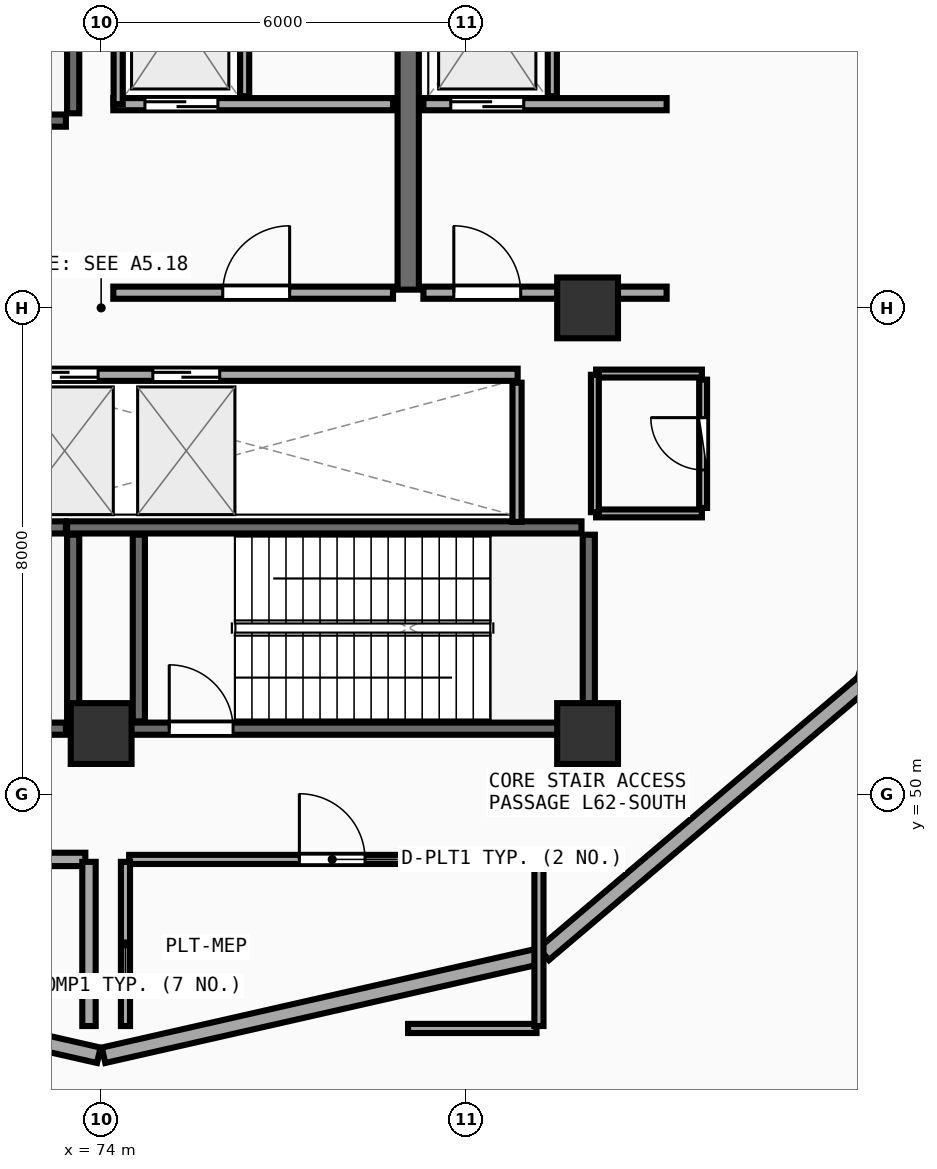
"""IFC4 building model, lengths in metres.
Left out: names, types, materials, properties, quantities, classifications, styles, units other than length and angle.
Written with IfcOpenShell. Run it as: python <this file> out.ifc"""

import sys

from ifc_helpers import new_model, si_unit, direction, frame, frame_2d, origin, origin_2d, place, context, subcontext, project, spatial, rectangle, extrude, element, fill, save


model = new_model("IFC4")
c1 = context("Model", 3, precision=1e-05, world=origin(), true_north=direction((0.0, 1.0)))
c2 = subcontext(c1, "Body", "Model", "MODEL_VIEW")
j1 = project(units=[si_unit("LENGTHUNIT", "METRE"), si_unit("PLANEANGLEUNIT", "RADIAN")], contexts=[c1])
p1 = place(None, origin())
s1 = spatial("IfcSite", under=j1, at=p1, CompositionType="ELEMENT")
p2 = place(p1, origin())
s2 = spatial("IfcBuilding", under=s1, at=p2, CompositionType="ELEMENT")
p3 = place(p2, frame((0.0, 0.0, 242.96)))
s3 = spatial("IfcBuildingStorey", under=s2, at=p3, CompositionType="ELEMENT", Elevation=242.96)
for number, where, z_axis, x_axis in (
    (1, (74.0, 51.0, 0.0), (0.0, 0.0, 1.0), (1.0, 0.0, 0.0)),
    (2, (82.0, 51.0, 0.0), (0.0, 0.0, 1.0), (1.0, 0.0, 0.0)),
    (3, (82.0, 58.0, 0.0), (0.0, 0.0, 1.0), (1.0, 0.0, 0.0)),
):
    element("IfcColumn", number, at=place(p3, frame(where, z_axis=z_axis, x_axis=x_axis)), inside=s3, PredefinedType="PILASTER", context=c2, shape_type="SweptSolid", body=[
        extrude(rectangle(XDim=1.0, YDim=1.0, at=origin_2d()), origin(), (0.0, 0.0, 1.0), 5.74),
    ])
p4 = place(p3, frame((66.789, 47.339, 0.0), z_axis=(0.0, 0.0, 1.0), x_axis=(0.975128290494, -0.221641189938, 0.0)))
e4 = element("IfcWall", 4, at=p4, inside=s3, PredefinedType="SOLIDWALL", context=c2, shape_type="SweptSolid", body=[
    extrude(rectangle(XDim=7.355, YDim=0.26, at=frame_2d((3.677, 0.0))), origin(), (0.0, 0.0, 1.0), 5.06),
])
p5 = place(p4, frame((3.102, 0.0, 0.0)))
e5 = element("IfcOpeningElement", 5, at=p5, cuts=e4, PredefinedType="OPENING", context=c2, shape_type="SweptSolid", body=[
    extrude(rectangle(XDim=1.15, YDim=2.15, at=frame_2d((0.575, 1.075))), frame((0.0, 0.14, 0.0), z_axis=(0.0, -1.0, 0.0), x_axis=(1.0, 0.0, 0.0)), (0.0, 0.0, 1.0), 0.28),
])
p6 = place(p3, frame((74.039, 45.709, 0.0), z_axis=(0.0, 0.0, 1.0), x_axis=(0.975128290494, 0.221641189938, 0.0)))
e6 = element("IfcWall", 6, at=p6, inside=s3, PredefinedType="SOLIDWALL", context=c2, shape_type="SweptSolid", body=[
    extrude(rectangle(XDim=7.355, YDim=0.26, at=frame_2d((3.677, 0.0))), origin(), (0.0, 0.0, 1.0), 5.06),
])
p7 = place(p3, frame((81.281, 47.374, 0.0), z_axis=(0.0, 0.0, 1.0), x_axis=(0.762580748943, 0.646893037018, 0.0)))
e7 = element("IfcWall", 7, at=p7, inside=s3, PredefinedType="SOLIDWALL", context=c2, shape_type="SweptSolid", body=[
    extrude(rectangle(XDim=6.88, YDim=0.26, at=frame_2d((3.44, 0.0))), origin(), (0.0, 0.0, 1.0), 5.06),
])
p8 = place(p3, frame((66.26, 61.08, 0.0), z_axis=(0.0, 0.0, 1.0), x_axis=(1.0, 0.0, 0.0)))
e8 = element("IfcWall", 8, at=p8, inside=s3, PredefinedType="SHEAR", context=c2, shape_type="SweptSolid", body=[
    extrude(rectangle(XDim=7.16, YDim=0.2, at=frame_2d((3.58, 0.0))), origin(), (0.0, 0.0, 1.0), 5.48),
])
p9 = place(p3, frame((73.54, 61.2, 0.0), z_axis=(0.0, 0.0, 1.0), x_axis=(0.0, 1.0, 0.0)))
e9 = element("IfcWall", 9, at=p9, inside=s3, PredefinedType="SHEAR", context=c2, shape_type="SweptSolid", body=[
    extrude(rectangle(XDim=3.07, YDim=0.2, at=frame_2d((1.535, 0.0))), origin(), (0.0, 0.0, 1.0), 5.48),
])
p10 = place(p3, frame((74.0, 51.08, 0.0), z_axis=(0.0, 0.0, 1.0), x_axis=(1.0, 0.0, 0.0)))
e10 = element("IfcWall", 10, at=p10, inside=s3, PredefinedType="SHEAR", context=c2, shape_type="SweptSolid", body=[
    extrude(rectangle(XDim=7.9, YDim=0.2, at=frame_2d((3.95, 0.0))), origin(), (0.0, 0.0, 1.0), 5.48),
])
p11 = place(p10, frame((1.12, 0.0, 0.0)))
e11 = element("IfcOpeningElement", 11, at=p11, cuts=e10, PredefinedType="OPENING", context=c2, shape_type="SweptSolid", body=[
    extrude(rectangle(XDim=1.05, YDim=2.1, at=frame_2d((0.525, 1.05))), frame((0.0, 0.11, 0.0), z_axis=(0.0, -1.0, 0.0), x_axis=(1.0, 0.0, 0.0)), (0.0, 0.0, 1.0), 0.22),
])
p12 = place(p3, frame((82.02, 51.2, 0.0), z_axis=(0.0, 0.0, 1.0), x_axis=(0.0, 1.0, 0.0)))
e12 = element("IfcWall", 12, at=p12, inside=s3, PredefinedType="SHEAR", context=c2, shape_type="SweptSolid", body=[
    extrude(rectangle(XDim=3.07, YDim=0.2, at=frame_2d((1.535, 0.0))), origin(), (0.0, 0.0, 1.0), 5.48),
])
p13 = place(p3, frame((81.9, 54.39, 0.0), z_axis=(0.0, 0.0, 1.0), x_axis=(-1.0, 0.0, 0.0)))
e13 = element("IfcWall", 13, at=p13, inside=s3, PredefinedType="SHEAR", context=c2, shape_type="SweptSolid", body=[
    extrude(rectangle(XDim=8.46, YDim=0.2, at=frame_2d((4.23, 0.0))), origin(), (0.0, 0.0, 1.0), 5.48),
])
p14 = place(p3, frame((74.62, 54.27, 0.0), z_axis=(0.0, 0.0, 1.0), x_axis=(0.0, -1.0, 0.0)))
e14 = element("IfcWall", 14, at=p14, inside=s3, PredefinedType="SHEAR", context=c2, shape_type="SweptSolid", body=[
    extrude(rectangle(XDim=3.07, YDim=0.2, at=frame_2d((1.535, 0.0))), origin(), (0.0, 0.0, 1.0), 5.48),
])
p15 = place(p3, frame((66.26, 51.08, 0.0), z_axis=(0.0, 0.0, 1.0), x_axis=(1.0, 0.0, 0.0)))
e15 = element("IfcWall", 15, at=p15, inside=s3, PredefinedType="SHEAR", context=c2, shape_type="SweptSolid", body=[
    extrude(rectangle(XDim=7.16, YDim=0.2, at=frame_2d((3.58, 0.0))), origin(), (0.0, 0.0, 1.0), 5.48),
])
p16 = place(p3, frame((73.54, 51.2, 0.0), z_axis=(0.0, 0.0, 1.0), x_axis=(0.0, 1.0, 0.0)))
e16 = element("IfcWall", 16, at=p16, inside=s3, PredefinedType="SHEAR", context=c2, shape_type="SweptSolid", body=[
    extrude(rectangle(XDim=3.07, YDim=0.2, at=frame_2d((1.535, 0.0))), origin(), (0.0, 0.0, 1.0), 5.48),
])
p17 = place(p3, frame((73.42, 54.39, 0.0), z_axis=(0.0, 0.0, 1.0), x_axis=(-1.0, 0.0, 0.0)))
e17 = element("IfcWall", 17, at=p17, inside=s3, PredefinedType="SHEAR", context=c2, shape_type="SweptSolid", body=[
    extrude(rectangle(XDim=7.16, YDim=0.2, at=frame_2d((3.58, 0.0))), origin(), (0.0, 0.0, 1.0), 5.48),
])
p18 = place(p3, frame((79.05, 58.3, 0.0), z_axis=(0.0, 0.0, 1.0), x_axis=(0.0, 1.0, 0.0)))
e18 = element("IfcWall", 18, at=p18, inside=s3, PredefinedType="SHEAR", context=c2, shape_type="SweptSolid", body=[
    extrude(rectangle(XDim=6.3, YDim=0.35, at=frame_2d((3.15, 0.0))), origin(), (0.0, 0.0, 1.0), 5.48),
])
p19 = place(p3, frame((74.2, 61.35, 0.0), z_axis=(0.0, 0.0, 1.0), x_axis=(1.0, 0.0, 0.0)))
e19 = element("IfcWall", 19, at=p19, inside=s3, PredefinedType="SOLIDWALL", context=c2, shape_type="SweptSolid", body=[
    extrude(rectangle(XDim=4.6, YDim=0.2, at=frame_2d((2.3, 0.0))), origin(), (0.0, 0.0, 1.0), 5.47),
])
p20 = place(p19, frame((0.52, 0.0, 0.0)))
e20 = element("IfcOpeningElement", 20, at=p20, cuts=e19, PredefinedType="OPENING", context=c2, shape_type="SweptSolid", body=[
    extrude(rectangle(XDim=1.2, YDim=2.15, at=frame_2d((0.6, 1.075))), frame((0.0, 0.11, 0.0), z_axis=(0.0, -1.0, 0.0), x_axis=(1.0, 0.0, 0.0)), (0.0, 0.0, 1.0), 0.22),
])
p21 = place(p3, frame((74.28, 61.35, 0.0), z_axis=(0.0, 0.0, 1.0), x_axis=(0.0, 1.0, 0.0)))
e21 = element("IfcWall", 21, at=p21, inside=s3, PredefinedType="PARTITIONING", context=c2, shape_type="SweptSolid", body=[
    extrude(rectangle(XDim=2.97, YDim=0.15, at=frame_2d((1.485, 0.0))), origin(), (0.0, 0.0, 1.0), 5.47),
])
p22 = place(p3, frame((76.36, 61.48, 0.0), z_axis=(0.0, 0.0, 1.0), x_axis=(0.0, 1.0, 0.0)))
e22 = element("IfcWall", 22, at=p22, inside=s3, PredefinedType="PARTITIONING", context=c2, shape_type="SweptSolid", body=[
    extrude(rectangle(XDim=2.84, YDim=0.15, at=frame_2d((1.42, 0.0))), origin(), (0.0, 0.0, 1.0), 5.47),
])
p23 = place(p3, frame((79.3, 61.35, 0.0), z_axis=(0.0, 0.0, 1.0), x_axis=(1.0, 0.0, 0.0)))
e23 = element("IfcWall", 23, at=p23, inside=s3, PredefinedType="SOLIDWALL", context=c2, shape_type="SweptSolid", body=[
    extrude(rectangle(XDim=4.0, YDim=0.2, at=frame_2d((2.0, 0.0))), origin(), (0.0, 0.0, 1.0), 4.765),
])
p24 = place(p23, frame((0.45, 0.0, 0.0)))
e24 = element("IfcOpeningElement", 24, at=p24, cuts=e23, PredefinedType="OPENING", context=c2, shape_type="SweptSolid", body=[
    extrude(rectangle(XDim=1.2, YDim=2.15, at=frame_2d((0.6, 1.075))), frame((0.0, 0.11, 0.0), z_axis=(0.0, -1.0, 0.0), x_axis=(1.0, 0.0, 0.0)), (0.0, 0.0, 1.0), 0.22),
])
p25 = place(p3, frame((81.42, 61.48, 0.0), z_axis=(0.0, 0.0, 1.0), x_axis=(0.0, 1.0, 0.0)))
e25 = element("IfcWall", 25, at=p25, inside=s3, PredefinedType="PARTITIONING", context=c2, shape_type="SweptSolid", body=[
    extrude(rectangle(XDim=2.84, YDim=0.15, at=frame_2d((1.42, 0.0))), origin(), (0.0, 0.0, 1.0), 5.47),
])
p26 = place(p3, frame((74.2, 58.25, 0.0), z_axis=(0.0, 0.0, 1.0), x_axis=(1.0, 0.0, 0.0)))
e26 = element("IfcWall", 26, at=p26, inside=s3, PredefinedType="SOLIDWALL", context=c2, shape_type="SweptSolid", body=[
    extrude(rectangle(XDim=4.6, YDim=0.2, at=frame_2d((2.3, 0.0))), origin(), (0.0, 0.0, 1.0), 5.47),
])
p27 = place(p26, frame((1.8, 0.0, 0.0)))
e27 = element("IfcOpeningElement", 27, at=p27, cuts=e26, PredefinedType="OPENING", context=c2, shape_type="SweptSolid", body=[
    extrude(rectangle(XDim=1.1, YDim=2.1, at=frame_2d((0.55, 1.05))), frame((0.0, 0.11, 0.0), z_axis=(0.0, -1.0, 0.0), x_axis=(1.0, 0.0, 0.0)), (0.0, 0.0, 1.0), 0.22),
])
p28 = place(p3, frame((79.3, 58.25, 0.0), z_axis=(0.0, 0.0, 1.0), x_axis=(1.0, 0.0, 0.0)))
e28 = element("IfcWall", 28, at=p28, inside=s3, PredefinedType="SOLIDWALL", context=c2, shape_type="SweptSolid", body=[
    extrude(rectangle(XDim=4.0, YDim=0.2, at=frame_2d((2.0, 0.0))), origin(), (0.0, 0.0, 1.0), 4.765),
])
p29 = place(p28, frame((0.5, 0.0, 0.0)))
e29 = element("IfcOpeningElement", 29, at=p29, cuts=e28, PredefinedType="OPENING", context=c2, shape_type="SweptSolid", body=[
    extrude(rectangle(XDim=1.1, YDim=2.1, at=frame_2d((0.55, 1.05))), frame((0.0, 0.11, 0.0), z_axis=(0.0, -1.0, 0.0), x_axis=(1.0, 0.0, 0.0)), (0.0, 0.0, 1.0), 0.22),
])
p30 = place(p3, frame((72.45, 56.9, 0.0), z_axis=(0.0, 0.0, 1.0), x_axis=(1.0, 0.0, 0.0)))
e30 = element("IfcWall", 30, at=p30, inside=s3, PredefinedType="SOLIDWALL", context=c2, shape_type="SweptSolid", body=[
    extrude(rectangle(XDim=8.4, YDim=0.2, at=frame_2d((4.2, 0.0))), origin(), (0.0, 0.0, 1.0), 5.47),
])
p31 = place(p30, frame((0.4, 0.0, 0.0)))
e31 = element("IfcOpeningElement", 31, at=p31, cuts=e30, PredefinedType="OPENING", context=c2, shape_type="SweptSolid", body=[
    extrude(rectangle(XDim=1.1, YDim=2.1, at=frame_2d((0.55, 1.05))), frame((0.0, 0.11, 0.0), z_axis=(0.0, -1.0, 0.0), x_axis=(1.0, 0.0, 0.0)), (0.0, 0.0, 1.0), 0.22),
])
p32 = place(p30, frame((2.4, 0.0, 0.0)))
e32 = element("IfcOpeningElement", 32, at=p32, cuts=e30, PredefinedType="OPENING", context=c2, shape_type="SweptSolid", body=[
    extrude(rectangle(XDim=1.1, YDim=2.1, at=frame_2d((0.55, 1.05))), frame((0.0, 0.11, 0.0), z_axis=(0.0, -1.0, 0.0), x_axis=(1.0, 0.0, 0.0)), (0.0, 0.0, 1.0), 0.22),
])
p33 = place(p3, frame((80.84, 54.48, 0.0), z_axis=(0.0, 0.0, 1.0), x_axis=(0.0, 1.0, 0.0)))
e33 = element("IfcWall", 33, at=p33, inside=s3, PredefinedType="PARTITIONING", context=c2, shape_type="SweptSolid", body=[
    extrude(rectangle(XDim=2.29, YDim=0.15, at=frame_2d((1.145, 0.0))), origin(), (0.0, 0.0, 1.0), 5.47),
])
p34 = place(p3, frame((66.86, 48.93, 0.0), z_axis=(0.0, 0.0, 1.0), x_axis=(1.0, 0.0, 0.0)))
e34 = element("IfcWall", 34, at=p34, inside=s3, PredefinedType="SOLIDWALL", context=c2, shape_type="SweptSolid", body=[
    extrude(rectangle(XDim=6.88, YDim=0.22, at=frame_2d((3.44, 0.0))), origin(), (0.0, 0.0, 1.0), 5.065),
])
p35 = place(p34, frame((2.88, 0.0, 0.0)))
e35 = element("IfcOpeningElement", 35, at=p35, cuts=e34, PredefinedType="OPENING", context=c2, shape_type="SweptSolid", body=[
    extrude(rectangle(XDim=1.12, YDim=2.1, at=frame_2d((0.56, 1.05))), frame((0.0, 0.12, 0.0), z_axis=(0.0, -1.0, 0.0), x_axis=(1.0, 0.0, 0.0)), (0.0, 0.0, 1.0), 0.24),
])
p36 = place(p3, frame((74.46, 48.93, 0.0), z_axis=(0.0, 0.0, 1.0), x_axis=(1.0, 0.0, 0.0)))
e36 = element("IfcWall", 36, at=p36, inside=s3, PredefinedType="PARTITIONING", context=c2, shape_type="SweptSolid", body=[
    extrude(rectangle(XDim=6.68, YDim=0.15, at=frame_2d((3.34, 0.0))), origin(), (0.0, 0.0, 1.0), 5.065),
])
p37 = place(p36, frame((2.8, 0.0, 0.0)))
e37 = element("IfcOpeningElement", 37, at=p37, cuts=e36, PredefinedType="OPENING", context=c2, shape_type="SweptSolid", body=[
    extrude(rectangle(XDim=1.08, YDim=2.1, at=frame_2d((0.54, 1.05))), frame((0.0, 0.085, 0.0), z_axis=(0.0, -1.0, 0.0), x_axis=(1.0, 0.0, 0.0)), (0.0, 0.0, 1.0), 0.17),
])
p38 = place(p3, frame((83.9, 54.71, 0.0), z_axis=(0.0, 0.0, 1.0), x_axis=(0.0, 1.0, 0.0)))
e38 = element("IfcWall", 38, at=p38, inside=s3, PredefinedType="PLUMBINGWALL", context=c2, shape_type="SweptSolid", body=[
    extrude(rectangle(XDim=2.11, YDim=0.13, at=frame_2d((1.055, 0.0))), origin(), (0.0, 0.0, 1.0), 5.47),
])
p39 = place(p38, frame((0.625, 0.0, 0.0)))
e39 = element("IfcOpeningElement", 39, at=p39, cuts=e38, PredefinedType="OPENING", context=c2, shape_type="SweptSolid", body=[
    extrude(rectangle(XDim=0.86, YDim=2.05, at=frame_2d((0.43, 1.025))), frame((0.0, 0.075, 0.0), z_axis=(0.0, -1.0, 0.0), x_axis=(1.0, 0.0, 0.0)), (0.0, 0.0, 1.0), 0.15),
])
p40 = place(p3, frame((73.8, 46.19, 0.0), z_axis=(0.0, 0.0, 1.0), x_axis=(0.0, 1.0, 0.0)))
e40 = element("IfcWall", 40, at=p40, inside=s3, PredefinedType="SOLIDWALL", context=c2, shape_type="SweptSolid", body=[
    extrude(rectangle(XDim=2.7, YDim=0.22, at=frame_2d((1.35, 0.0))), origin(), (0.0, 0.0, 1.0), 5.225),
])
p41 = place(p3, frame((79.048, 46.15, 0.0), z_axis=(0.0, 0.0, 1.0), x_axis=(1.0, 0.0, 0.0)))
e41 = element("IfcWall", 41, at=p41, inside=s3, PredefinedType="PARTITIONING", context=c2, shape_type="SweptSolid", body=[
    extrude(rectangle(XDim=2.112, YDim=0.15, at=frame_2d((1.056, 0.0))), origin(), (0.0, 0.0, 1.0), 5.165),
])
p42 = place(p3, frame((81.2, 46.19, 0.0), z_axis=(0.0, 0.0, 1.0), x_axis=(0.0, 1.0, 0.0)))
e42 = element("IfcWall", 42, at=p42, inside=s3, PredefinedType="PARTITIONING", context=c2, shape_type="SweptSolid", body=[
    extrude(rectangle(XDim=2.7, YDim=0.15, at=frame_2d((1.35, 0.0))), origin(), (0.0, 0.0, 1.0), 5.165),
])
p43 = place(p3, frame((74.4, 48.89, 0.0), z_axis=(0.0, 0.0, 1.0), x_axis=(0.0, -1.0, 0.0)))
e43 = element("IfcWall", 43, at=p43, inside=s3, PredefinedType="PARTITIONING", context=c2, shape_type="SweptSolid", body=[
    extrude(rectangle(XDim=2.7, YDim=0.15, at=frame_2d((1.35, 0.0))), origin(), (0.0, 0.0, 1.0), 5.225),
])
for number, where, z_axis, x_axis in (
    (44, (82.14, 54.62, 0.0), (0.0, 0.0, 1.0), (1.0, 0.0, 0.0)),
    (45, (83.88, 56.92, 0.0), (0.0, 0.0, 1.0), (-1.0, 0.0, 0.0)),
):
    element("IfcWall", number, at=place(p3, frame(where, z_axis=z_axis, x_axis=x_axis)), inside=s3, PredefinedType="PLUMBINGWALL", context=c2, shape_type="SweptSolid", body=[
        extrude(rectangle(XDim=1.74, YDim=0.13, at=frame_2d((0.87, 0.0))), origin(), (0.0, 0.0, 1.0), 4.765),
    ])
p44 = place(p3, frame((82.12, 56.9, 0.0), z_axis=(0.0, 0.0, 1.0), x_axis=(0.0, -1.0, 0.0)))
e46 = element("IfcWall", 46, at=p44, inside=s3, PredefinedType="PLUMBINGWALL", context=c2, shape_type="SweptSolid", body=[
    extrude(rectangle(XDim=2.26, YDim=0.13, at=frame_2d((1.13, 0.0))), origin(), (0.0, 0.0, 1.0), 4.765),
])
p45 = place(p11, origin())
e47 = element("IfcDoor", 47, at=p45, inside=s3, OperationType="SINGLE_SWING_LEFT", PredefinedType="DOOR", context=c2, shape_type="SweptSolid", body=[
    extrude(rectangle(XDim=1.05, YDim=2.1, at=frame_2d((0.525, 1.05))), frame((0.0, 0.025, 0.0), z_axis=(0.0, -1.0, 0.0), x_axis=(1.0, 0.0, 0.0)), (0.0, 0.0, 1.0), 0.05),
])
fill(e11, e47)
p46 = place(p20, origin())
e48 = element("IfcDoor", 48, at=p46, inside=s3, OperationType="DOUBLE_DOOR_SLIDING", PredefinedType="DOOR", context=c2, shape_type="SweptSolid", body=[
    extrude(rectangle(XDim=1.2, YDim=2.15, at=frame_2d((0.6, 1.075))), frame((0.0, 0.025, 0.0), z_axis=(0.0, -1.0, 0.0), x_axis=(1.0, 0.0, 0.0)), (0.0, 0.0, 1.0), 0.05),
])
fill(e20, e48)
p47 = place(p24, origin())
e49 = element("IfcDoor", 49, at=p47, inside=s3, OperationType="DOUBLE_DOOR_SLIDING", PredefinedType="DOOR", context=c2, shape_type="SweptSolid", body=[
    extrude(rectangle(XDim=1.2, YDim=2.15, at=frame_2d((0.6, 1.075))), frame((0.0, 0.025, 0.0), z_axis=(0.0, -1.0, 0.0), x_axis=(1.0, 0.0, 0.0)), (0.0, 0.0, 1.0), 0.05),
])
fill(e24, e49)
p48 = place(p27, frame((1.1, 0.0, 0.0), z_axis=(0.0, 0.0, 1.0), x_axis=(-1.0, 0.0, 0.0)))
e50 = element("IfcDoor", 50, at=p48, inside=s3, OperationType="SINGLE_SWING_LEFT", PredefinedType="DOOR", context=c2, shape_type="SweptSolid", body=[
    extrude(rectangle(XDim=1.1, YDim=2.1, at=frame_2d((0.55, 1.05))), frame((0.0, 0.025, 0.0), z_axis=(0.0, -1.0, 0.0), x_axis=(1.0, 0.0, 0.0)), (0.0, 0.0, 1.0), 0.05),
])
fill(e27, e50)
p49 = place(p29, frame((1.1, 0.0, 0.0), z_axis=(0.0, 0.0, 1.0), x_axis=(-1.0, 0.0, 0.0)))
e51 = element("IfcDoor", 51, at=p49, inside=s3, OperationType="SINGLE_SWING_RIGHT", PredefinedType="DOOR", context=c2, shape_type="SweptSolid", body=[
    extrude(rectangle(XDim=1.1, YDim=2.1, at=frame_2d((0.55, 1.05))), frame((0.0, 0.025, 0.0), z_axis=(0.0, -1.0, 0.0), x_axis=(1.0, 0.0, 0.0)), (0.0, 0.0, 1.0), 0.05),
])
fill(e29, e51)
p50 = place(p31, origin())
e52 = element("IfcDoor", 52, at=p50, inside=s3, OperationType="DOUBLE_DOOR_SLIDING", PredefinedType="DOOR", context=c2, shape_type="SweptSolid", body=[
    extrude(rectangle(XDim=1.1, YDim=2.1, at=frame_2d((0.55, 1.05))), frame((0.0, 0.025, 0.0), z_axis=(0.0, -1.0, 0.0), x_axis=(1.0, 0.0, 0.0)), (0.0, 0.0, 1.0), 0.05),
])
fill(e31, e52)
p51 = place(p32, origin())
e53 = element("IfcDoor", 53, at=p51, inside=s3, OperationType="DOUBLE_DOOR_SLIDING", PredefinedType="DOOR", context=c2, shape_type="SweptSolid", body=[
    extrude(rectangle(XDim=1.1, YDim=2.1, at=frame_2d((0.55, 1.05))), frame((0.0, 0.025, 0.0), z_axis=(0.0, -1.0, 0.0), x_axis=(1.0, 0.0, 0.0)), (0.0, 0.0, 1.0), 0.05),
])
fill(e32, e53)
p52 = place(p37, origin())
e54 = element("IfcDoor", 54, at=p52, inside=s3, OperationType="SINGLE_SWING_LEFT", PredefinedType="DOOR", context=c2, shape_type="SweptSolid", body=[
    extrude(rectangle(XDim=1.08, YDim=2.1, at=frame_2d((0.54, 1.05))), frame((0.0, 0.025, 0.0), z_axis=(0.0, -1.0, 0.0), x_axis=(1.0, 0.0, 0.0)), (0.0, 0.0, 1.0), 0.05),
])
fill(e37, e54)
p53 = place(p39, origin())
e55 = element("IfcDoor", 55, at=p53, inside=s3, OperationType="SINGLE_SWING_RIGHT", PredefinedType="DOOR", context=c2, shape_type="SweptSolid", body=[
    extrude(rectangle(XDim=0.86, YDim=2.05, at=frame_2d((0.43, 1.025))), frame((0.0, 0.025, 0.0), z_axis=(0.0, -1.0, 0.0), x_axis=(1.0, 0.0, 0.0)), (0.0, 0.0, 1.0), 0.05),
])
fill(e39, e55)
save(model, sys.argv[1])
